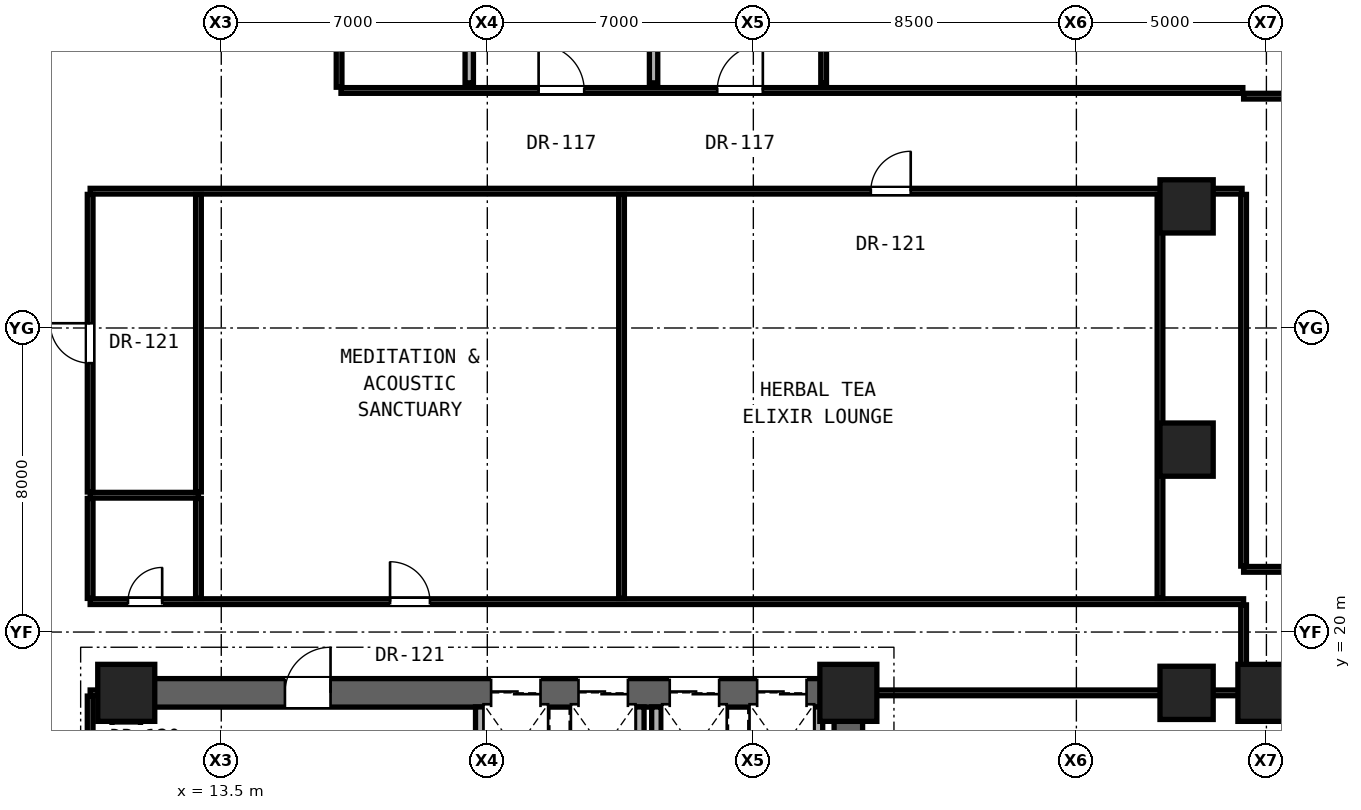
"""IFC4 building model, lengths in metres.
Left out: names, types, materials, properties, quantities, classifications, styles, units other than length and angle.
Written with IfcOpenShell. Run it as: python <this file> out.ifc"""

import sys

from ifc_helpers import new_model, si_unit, direction, frame, frame_2d, origin, origin_2d, place, context, subcontext, project, spatial, rectangle, hollow_rectangle, extrude, element, fill, save


model = new_model("IFC4")
c1 = context("Model", 3, precision=1e-05, world=origin(), true_north=direction((0.0, 1.0)))
c2 = subcontext(c1, "Body", "Model", "MODEL_VIEW")
j1 = project(units=[si_unit("LENGTHUNIT", "METRE"), si_unit("PLANEANGLEUNIT", "RADIAN")], contexts=[c1])
p1 = place(None, origin())
s1 = spatial("IfcSite", under=j1, at=p1, CompositionType="ELEMENT")
p2 = place(p1, origin())
s2 = spatial("IfcBuilding", under=s1, at=p2, CompositionType="ELEMENT")
p3 = place(p2, frame((0.0, 0.0, 18.1)))
s3 = spatial("IfcBuildingStorey", under=s2, at=p3, CompositionType="ELEMENT", Elevation=18.1)
for number, where, z_axis, x_axis in (
    (1, (11.0, 18.4, 0.0), (0.0, 0.0, 1.0), (1.0, 0.0, 0.0)),
    (2, (30.0, 18.4, 0.0), (0.0, 0.0, 1.0), (1.0, 0.0, 0.0)),
):
    element("IfcColumn", number, at=place(p3, frame(where, z_axis=z_axis, x_axis=x_axis)), inside=s3, PredefinedType="COLUMN", context=c2, shape_type="SweptSolid", body=[
        extrude(rectangle(XDim=1.5, YDim=1.5, at=origin_2d()), origin(), (0.0, 0.0, 1.0), 4.3),
    ])
for number, where, z_axis, x_axis in (
    (3, (38.9, 18.4, 0.0), (0.0, 0.0, 1.0), (1.0, 0.0, 0.0)),
    (4, (38.9, 24.8, 0.0), (0.0, 0.0, 1.0), (1.0, 0.0, 0.0)),
    (5, (38.9, 31.2, 0.0), (0.0, 0.0, 1.0), (1.0, 0.0, 0.0)),
):
    element("IfcColumn", number, at=place(p3, frame(where, z_axis=z_axis, x_axis=x_axis)), inside=s3, PredefinedType="COLUMN", context=c2, shape_type="SweptSolid", body=[
        extrude(hollow_rectangle(XDim=1.4, YDim=1.4, WallThickness=0.08, at=origin_2d()), origin(), (0.0, 0.0, 1.0), 4.3),
    ])
for number, where, z_axis, x_axis in (
    (6, (11.0, 12.4, 0.0), (0.0, 0.0, 1.0), (0.0, 1.0, 0.0)),
    (7, (30.0, 12.4, 0.0), (0.0, 0.0, 1.0), (0.0, 1.0, 0.0)),
):
    element("IfcWall", number, at=place(p3, frame(where, z_axis=z_axis, x_axis=x_axis)), inside=s3, PredefinedType="SHEAR", context=c2, shape_type="SweptSolid", body=[
        extrude(rectangle(XDim=6.0, YDim=0.75, at=frame_2d((3.0, 0.0))), origin(), (0.0, 0.0, 1.0), 3.65),
    ])
p4 = place(p3, frame((11.0, 18.4, 0.0), z_axis=(0.0, 0.0, 1.0), x_axis=(1.0, 0.0, 0.0)))
e8 = element("IfcWall", 8, at=p4, inside=s3, PredefinedType="SHEAR", context=c2, shape_type="SweptSolid", body=[
    extrude(rectangle(XDim=19.0, YDim=0.75, at=frame_2d((9.5, 0.0))), origin(), (0.0, 0.0, 1.0), 3.65),
])
p5 = place(p4, frame((4.175, 0.0, 0.0)))
e9 = element("IfcOpeningElement", 9, at=p5, cuts=e8, PredefinedType="OPENING", context=c2, shape_type="SweptSolid", body=[
    extrude(rectangle(XDim=1.2, YDim=2.25, at=frame_2d((0.6, 1.125))), frame((0.0, 0.385, 0.0), z_axis=(0.0, -1.0, 0.0), x_axis=(1.0, 0.0, 0.0)), (0.0, 0.0, 1.0), 0.77),
])
p6 = place(p4, frame((9.6, 0.0, 0.0)))
e10 = element("IfcOpeningElement", 10, at=p6, cuts=e8, PredefinedType="OPENING", context=c2, shape_type="SweptSolid", body=[
    extrude(rectangle(XDim=1.3, YDim=2.3, at=frame_2d((0.65, 1.15))), frame((0.0, 0.385, 0.0), z_axis=(0.0, -1.0, 0.0), x_axis=(1.0, 0.0, 0.0)), (0.0, 0.0, 1.0), 0.77),
])
p7 = place(p4, frame((11.9, 0.0, 0.0)))
e11 = element("IfcOpeningElement", 11, at=p7, cuts=e8, PredefinedType="OPENING", context=c2, shape_type="SweptSolid", body=[
    extrude(rectangle(XDim=1.3, YDim=2.3, at=frame_2d((0.65, 1.15))), frame((0.0, 0.385, 0.0), z_axis=(0.0, -1.0, 0.0), x_axis=(1.0, 0.0, 0.0)), (0.0, 0.0, 1.0), 0.77),
])
p8 = place(p4, frame((14.3, 0.0, 0.0)))
e12 = element("IfcOpeningElement", 12, at=p8, cuts=e8, PredefinedType="OPENING", context=c2, shape_type="SweptSolid", body=[
    extrude(rectangle(XDim=1.3, YDim=2.3, at=frame_2d((0.65, 1.15))), frame((0.0, 0.385, 0.0), z_axis=(0.0, -1.0, 0.0), x_axis=(1.0, 0.0, 0.0)), (0.0, 0.0, 1.0), 0.77),
])
p9 = place(p4, frame((16.6, 0.0, 0.0)))
e13 = element("IfcOpeningElement", 13, at=p9, cuts=e8, PredefinedType="OPENING", context=c2, shape_type="SweptSolid", body=[
    extrude(rectangle(XDim=1.3, YDim=2.3, at=frame_2d((0.65, 1.15))), frame((0.0, 0.385, 0.0), z_axis=(0.0, -1.0, 0.0), x_axis=(1.0, 0.0, 0.0)), (0.0, 0.0, 1.0), 0.77),
])
p10 = place(p3, frame((41.0, 18.4, 0.0), z_axis=(0.0, 0.0, 1.0), x_axis=(1.0, 0.0, 0.0)))
e14 = element("IfcColumn", 14, at=p10, inside=s3, PredefinedType="COLUMN", context=c2, shape_type="SweptSolid", body=[
    extrude(rectangle(XDim=1.5, YDim=1.5, at=origin_2d()), origin(), (0.0, 0.0, 1.0), 4.3),
])
p11 = place(p3, frame((10.05, 18.4, 0.0), z_axis=(0.0, 0.0, 1.0), x_axis=(1.0, 0.0, 0.0)))
e15 = element("IfcWall", 15, at=p11, inside=s3, PredefinedType="PARTITIONING", context=c2, shape_type="SweptSolid", body=[
    extrude(rectangle(XDim=0.58, YDim=0.15, at=frame_2d((0.29, 0.0))), origin(), (0.0, 0.0, 1.0), 2.542),
])
p12 = place(p3, frame((30.37, 18.4, 0.0), z_axis=(0.0, 0.0, 1.0), x_axis=(1.0, 0.0, 0.0)))
e16 = element("IfcWall", 16, at=p12, inside=s3, PredefinedType="PARTITIONING", context=c2, shape_type="SweptSolid", body=[
    extrude(rectangle(XDim=10.03, YDim=0.15, at=frame_2d((5.015, 0.0))), origin(), (0.0, 0.0, 1.0), 2.542),
])
p13 = place(p3, frame((10.05, 20.8, 0.0), z_axis=(0.0, 0.0, 1.0), x_axis=(1.0, 0.0, 0.0)))
e17 = element("IfcWall", 17, at=p13, inside=s3, PredefinedType="PARTITIONING", context=c2, shape_type="SweptSolid", body=[
    extrude(rectangle(XDim=30.35, YDim=0.15, at=frame_2d((15.175, 0.0))), origin(), (0.0, 0.0, 1.0), 2.602),
])
p14 = place(p13, frame((0.995, 0.0, 0.0)))
e18 = element("IfcOpeningElement", 18, at=p14, cuts=e17, PredefinedType="OPENING", context=c2, shape_type="SweptSolid", body=[
    extrude(rectangle(XDim=0.9, YDim=2.1, at=frame_2d((0.45, 1.05))), frame((0.0, 0.085, 0.0), z_axis=(0.0, -1.0, 0.0), x_axis=(1.0, 0.0, 0.0)), (0.0, 0.0, 1.0), 0.17),
])
p15 = place(p13, frame((7.891, 0.0, 0.0)))
e19 = element("IfcOpeningElement", 19, at=p15, cuts=e17, PredefinedType="OPENING", context=c2, shape_type="SweptSolid", body=[
    extrude(rectangle(XDim=1.05, YDim=2.2, at=frame_2d((0.525, 1.1))), frame((0.0, 0.085, 0.0), z_axis=(0.0, -1.0, 0.0), x_axis=(1.0, 0.0, 0.0)), (0.0, 0.0, 1.0), 0.17),
])
p16 = place(p3, frame((40.4, 21.65, 0.0), z_axis=(0.0, 0.0, 1.0), x_axis=(1.0, 0.0, 0.0)))
e20 = element("IfcWall", 20, at=p16, inside=s3, PredefinedType="PARTITIONING", context=c2, shape_type="SweptSolid", body=[
    extrude(rectangle(XDim=21.4, YDim=0.15, at=frame_2d((10.7, 0.0))), origin(), (0.0, 0.0, 1.0), 2.602),
])
p17 = place(p3, frame((10.05, 23.6, 0.0), z_axis=(0.0, 0.0, 1.0), x_axis=(1.0, 0.0, 0.0)))
e21 = element("IfcWall", 21, at=p17, inside=s3, PredefinedType="PARTITIONING", context=c2, shape_type="SweptSolid", body=[
    extrude(rectangle(XDim=2.85, YDim=0.15, at=frame_2d((1.425, 0.0))), origin(), (0.0, 0.0, 1.0), 2.602),
])
p18 = place(p3, frame((10.05, 31.6, 0.0), z_axis=(0.0, 0.0, 1.0), x_axis=(1.0, 0.0, 0.0)))
e22 = element("IfcWall", 22, at=p18, inside=s3, PredefinedType="PARTITIONING", context=c2, shape_type="SweptSolid", body=[
    extrude(rectangle(XDim=30.31, YDim=0.15, at=frame_2d((15.155, 0.0))), origin(), (0.0, 0.0, 1.0), 2.602),
])
p19 = place(p18, frame((20.541, 0.0, 0.0)))
e23 = element("IfcOpeningElement", 23, at=p19, cuts=e22, PredefinedType="OPENING", context=c2, shape_type="SweptSolid", body=[
    extrude(rectangle(XDim=1.05, YDim=2.2, at=frame_2d((0.525, 1.1))), frame((0.0, 0.085, 0.0), z_axis=(0.0, -1.0, 0.0), x_axis=(1.0, 0.0, 0.0)), (0.0, 0.0, 1.0), 0.17),
])
p20 = place(p3, frame((40.4, 34.1, 0.0), z_axis=(0.0, 0.0, 1.0), x_axis=(1.0, 0.0, 0.0)))
e24 = element("IfcWall", 24, at=p20, inside=s3, PredefinedType="PARTITIONING", context=c2, shape_type="SweptSolid", body=[
    extrude(rectangle(XDim=21.4, YDim=0.15, at=frame_2d((10.7, 0.0))), origin(), (0.0, 0.0, 1.0), 2.602),
])
p21 = place(p3, frame((16.65, 34.25, 0.0), z_axis=(0.0, 0.0, 1.0), x_axis=(1.0, 0.0, 0.0)))
e25 = element("IfcWall", 25, at=p21, inside=s3, PredefinedType="PARTITIONING", context=c2, shape_type="SweptSolid", body=[
    extrude(rectangle(XDim=23.73, YDim=0.15, at=frame_2d((11.865, 0.0))), origin(), (0.0, 0.0, 1.0), 2.602),
])
p22 = place(p21, frame((5.2, 0.0, 0.0)))
e26 = element("IfcOpeningElement", 26, at=p22, cuts=e25, PredefinedType="OPENING", context=c2, shape_type="SweptSolid", body=[
    extrude(rectangle(XDim=1.2, YDim=2.25, at=frame_2d((0.6, 1.125))), frame((0.0, 0.085, 0.0), z_axis=(0.0, -1.0, 0.0), x_axis=(1.0, 0.0, 0.0)), (0.0, 0.0, 1.0), 0.17),
])
p23 = place(p21, frame((9.9, 0.0, 0.0)))
e27 = element("IfcOpeningElement", 27, at=p23, cuts=e25, PredefinedType="OPENING", context=c2, shape_type="SweptSolid", body=[
    extrude(rectangle(XDim=1.2, YDim=2.25, at=frame_2d((0.6, 1.125))), frame((0.0, 0.085, 0.0), z_axis=(0.0, -1.0, 0.0), x_axis=(1.0, 0.0, 0.0)), (0.0, 0.0, 1.0), 0.17),
])
p24 = place(p3, frame((10.05, 12.735, 0.0), z_axis=(0.0, 0.0, 1.0), x_axis=(0.0, 1.0, 0.0)))
e28 = element("IfcWall", 28, at=p24, inside=s3, PredefinedType="PARTITIONING", context=c2, shape_type="SweptSolid", body=[
    extrude(rectangle(XDim=5.58, YDim=0.15, at=frame_2d((2.79, 0.0))), origin(), (0.0, 0.0, 1.0), 2.542),
])
p25 = place(p3, frame((10.05, 20.885, 0.0), z_axis=(0.0, 0.0, 1.0), x_axis=(0.0, 1.0, 0.0)))
e29 = element("IfcWall", 29, at=p25, inside=s3, PredefinedType="PARTITIONING", context=c2, shape_type="SweptSolid", body=[
    extrude(rectangle(XDim=2.63, YDim=0.15, at=frame_2d((1.315, 0.0))), origin(), (0.0, 0.0, 1.0), 3.65),
])
p26 = place(p3, frame((10.05, 23.685, 0.0), z_axis=(0.0, 0.0, 1.0), x_axis=(0.0, 1.0, 0.0)))
e30 = element("IfcWall", 30, at=p26, inside=s3, PredefinedType="PARTITIONING", context=c2, shape_type="SweptSolid", body=[
    extrude(rectangle(XDim=7.83, YDim=0.15, at=frame_2d((3.915, 0.0))), origin(), (0.0, 0.0, 1.0), 2.869),
])
p27 = place(p26, frame((3.39, 0.0, 0.0)))
e31 = element("IfcOpeningElement", 31, at=p27, cuts=e30, PredefinedType="OPENING", context=c2, shape_type="SweptSolid", body=[
    extrude(rectangle(XDim=1.05, YDim=2.2, at=frame_2d((0.525, 1.1))), frame((0.0, 0.085, 0.0), z_axis=(0.0, -1.0, 0.0), x_axis=(1.0, 0.0, 0.0)), (0.0, 0.0, 1.0), 0.17),
])
p28 = place(p3, frame((12.9, 20.885, 0.0), z_axis=(0.0, 0.0, 1.0), x_axis=(0.0, 1.0, 0.0)))
e32 = element("IfcWall", 32, at=p28, inside=s3, PredefinedType="PARTITIONING", context=c2, shape_type="SweptSolid", body=[
    extrude(rectangle(XDim=2.63, YDim=0.15, at=frame_2d((1.315, 0.0))), origin(), (0.0, 0.0, 1.0), 3.65),
])
p29 = place(p3, frame((12.9, 23.685, 0.0), z_axis=(0.0, 0.0, 1.0), x_axis=(0.0, 1.0, 0.0)))
e33 = element("IfcWall", 33, at=p29, inside=s3, PredefinedType="PARTITIONING", context=c2, shape_type="SweptSolid", body=[
    extrude(rectangle(XDim=7.83, YDim=0.15, at=frame_2d((3.915, 0.0))), origin(), (0.0, 0.0, 1.0), 2.602),
])
p30 = place(p3, frame((16.6, 34.335, 0.0), z_axis=(0.0, 0.0, 1.0), x_axis=(0.0, 1.0, 0.0)))
e34 = element("IfcWall", 34, at=p30, inside=s3, PredefinedType="PARTITIONING", context=c2, shape_type="SweptSolid", body=[
    extrude(rectangle(XDim=2.895, YDim=0.15, at=frame_2d((1.448, 0.0))), origin(), (0.0, 0.0, 1.0), 3.65),
])
p31 = place(p30, frame((1.06, 0.0, 0.0)))
e35 = element("IfcOpeningElement", 35, at=p31, cuts=e34, PredefinedType="OPENING", context=c2, shape_type="SweptSolid", body=[
    extrude(rectangle(XDim=0.85, YDim=2.01, at=frame_2d((0.425, 1.005))), frame((0.0, 0.085, 0.0), z_axis=(0.0, -1.0, 0.0), x_axis=(1.0, 0.0, 0.0)), (0.0, 0.0, 1.0), 0.17),
])
p32 = place(p3, frame((20.025, 34.45, 0.0), z_axis=(0.0, 0.0, 1.0), x_axis=(0.0, 1.0, 0.0)))
e36 = element("IfcWall", 36, at=p32, inside=s3, PredefinedType="SOLIDWALL", context=c2, shape_type="SweptSolid", body=[
    extrude(rectangle(XDim=2.78, YDim=0.22, at=frame_2d((1.39, 0.0))), origin(), (0.0, 0.0, 1.0), 3.65),
])
p33 = place(p3, frame((20.315, 16.555, 0.0), z_axis=(0.0, 0.0, 1.0), x_axis=(0.0, 1.0, 0.0)))
e37 = element("IfcWall", 37, at=p33, inside=s3, PredefinedType="SOLIDWALL", context=c2, shape_type="SweptSolid", body=[
    extrude(rectangle(XDim=1.475, YDim=0.25, at=frame_2d((0.738, 0.0))), origin(), (0.0, 0.0, 1.0), 3.65),
])
p34 = place(p3, frame((24.032, 20.885, 0.0), z_axis=(0.0, 0.0, 1.0), x_axis=(0.0, 1.0, 0.0)))
e38 = element("IfcWall", 38, at=p34, inside=s3, PredefinedType="PARTITIONING", context=c2, shape_type="SweptSolid", body=[
    extrude(rectangle(XDim=10.63, YDim=0.15, at=frame_2d((5.315, 0.0))), origin(), (0.0, 0.0, 1.0), 2.602),
])
for number, where, z_axis, x_axis in (
    (39, (24.5, 15.785, 0.0), (0.0, 0.0, 1.0), (0.0, 1.0, 0.0)),
    (40, (24.95, 15.785, 0.0), (0.0, 0.0, 1.0), (0.0, 1.0, 0.0)),
):
    element("IfcWall", number, at=place(p3, frame(where, z_axis=z_axis, x_axis=x_axis)), inside=s3, PredefinedType="SOLIDWALL", context=c2, shape_type="SweptSolid", body=[
        extrude(rectangle(XDim=2.245, YDim=0.25, at=frame_2d((1.123, 0.0))), origin(), (0.0, 0.0, 1.0), 3.65),
    ])
p35 = place(p3, frame((24.875, 34.45, 0.0), z_axis=(0.0, 0.0, 1.0), x_axis=(0.0, 1.0, 0.0)))
e41 = element("IfcWall", 41, at=p35, inside=s3, PredefinedType="SOLIDWALL", context=c2, shape_type="SweptSolid", body=[
    extrude(rectangle(XDim=2.78, YDim=0.22, at=frame_2d((1.39, 0.0))), origin(), (0.0, 0.0, 1.0), 3.65),
])
p36 = place(p3, frame((29.2, 15.785, 0.0), z_axis=(0.0, 0.0, 1.0), x_axis=(0.0, 1.0, 0.0)))
e42 = element("IfcWall", 42, at=p36, inside=s3, PredefinedType="SOLIDWALL", context=c2, shape_type="SweptSolid", body=[
    extrude(rectangle(XDim=2.245, YDim=0.25, at=frame_2d((1.123, 0.0))), origin(), (0.0, 0.0, 1.0), 3.65),
])
p37 = place(p3, frame((29.35, 34.45, 0.0), z_axis=(0.0, 0.0, 1.0), x_axis=(0.0, 1.0, 0.0)))
e43 = element("IfcWall", 43, at=p37, inside=s3, PredefinedType="PARTITIONING", context=c2, shape_type="SweptSolid", body=[
    extrude(rectangle(XDim=2.78, YDim=0.15, at=frame_2d((1.39, 0.0))), origin(), (0.0, 0.0, 1.0), 3.65),
])
p38 = place(p3, frame((38.2, 20.885, 0.0), z_axis=(0.0, 0.0, 1.0), x_axis=(0.0, 1.0, 0.0)))
e44 = element("IfcWall", 44, at=p38, inside=s3, PredefinedType="PARTITIONING", context=c2, shape_type="SweptSolid", body=[
    extrude(rectangle(XDim=10.63, YDim=0.15, at=frame_2d((5.315, 0.0))), origin(), (0.0, 0.0, 1.0), 2.869),
])
p39 = place(p3, frame((40.4, 18.485, 0.0), z_axis=(0.0, 0.0, 1.0), x_axis=(0.0, 1.0, 0.0)))
e45 = element("IfcWall", 45, at=p39, inside=s3, PredefinedType="PARTITIONING", context=c2, shape_type="SweptSolid", body=[
    extrude(rectangle(XDim=2.23, YDim=0.15, at=frame_2d((1.115, 0.0))), origin(), (0.0, 0.0, 1.0), 2.694),
])
p40 = place(p3, frame((40.4, 21.735, 0.0), z_axis=(0.0, 0.0, 1.0), x_axis=(0.0, 1.0, 0.0)))
e46 = element("IfcWall", 46, at=p40, inside=s3, PredefinedType="PARTITIONING", context=c2, shape_type="SweptSolid", body=[
    extrude(rectangle(XDim=9.78, YDim=0.15, at=frame_2d((4.89, 0.0))), origin(), (0.0, 0.0, 1.0), 3.65),
])
p41 = place(p22, origin())
e47 = element("IfcDoor", 47, at=p41, inside=s3, OperationType="SINGLE_SWING_LEFT", PredefinedType="DOOR", context=c2, shape_type="SweptSolid", body=[
    extrude(rectangle(XDim=1.2, YDim=2.25, at=frame_2d((0.6, 1.125))), frame((0.0, 0.025, 0.0), z_axis=(0.0, -1.0, 0.0), x_axis=(1.0, 0.0, 0.0)), (0.0, 0.0, 1.0), 0.05),
])
fill(e26, e47)
p42 = place(p23, origin())
e48 = element("IfcDoor", 48, at=p42, inside=s3, OperationType="SINGLE_SWING_RIGHT", PredefinedType="DOOR", context=c2, shape_type="SweptSolid", body=[
    extrude(rectangle(XDim=1.2, YDim=2.25, at=frame_2d((0.6, 1.125))), frame((0.0, 0.025, 0.0), z_axis=(0.0, -1.0, 0.0), x_axis=(1.0, 0.0, 0.0)), (0.0, 0.0, 1.0), 0.05),
])
fill(e27, e48)
p43 = place(p5, origin())
e49 = element("IfcDoor", 49, at=p43, inside=s3, OperationType="SINGLE_SWING_RIGHT", PredefinedType="DOOR", context=c2, shape_type="SweptSolid", body=[
    extrude(rectangle(XDim=1.2, YDim=2.25, at=frame_2d((0.6, 1.125))), frame((0.0, 0.025, 0.0), z_axis=(0.0, -1.0, 0.0), x_axis=(1.0, 0.0, 0.0)), (0.0, 0.0, 1.0), 0.05),
])
fill(e9, e49)
p44 = place(p14, origin())
e50 = element("IfcDoor", 50, at=p44, inside=s3, OperationType="SINGLE_SWING_RIGHT", PredefinedType="DOOR", context=c2, shape_type="SweptSolid", body=[
    extrude(rectangle(XDim=0.9, YDim=2.1, at=frame_2d((0.45, 1.05))), frame((0.0, 0.025, 0.0), z_axis=(0.0, -1.0, 0.0), x_axis=(1.0, 0.0, 0.0)), (0.0, 0.0, 1.0), 0.05),
])
fill(e18, e50)
p45 = place(p27, origin())
e51 = element("IfcDoor", 51, at=p45, inside=s3, OperationType="SINGLE_SWING_RIGHT", PredefinedType="DOOR", context=c2, shape_type="SweptSolid", body=[
    extrude(rectangle(XDim=1.05, YDim=2.2, at=frame_2d((0.525, 1.1))), frame((0.0, 0.025, 0.0), z_axis=(0.0, -1.0, 0.0), x_axis=(1.0, 0.0, 0.0)), (0.0, 0.0, 1.0), 0.05),
])
fill(e31, e51)
p46 = place(p15, origin())
e52 = element("IfcDoor", 52, at=p46, inside=s3, OperationType="SINGLE_SWING_LEFT", PredefinedType="DOOR", context=c2, shape_type="SweptSolid", body=[
    extrude(rectangle(XDim=1.05, YDim=2.2, at=frame_2d((0.525, 1.1))), frame((0.0, 0.025, 0.0), z_axis=(0.0, -1.0, 0.0), x_axis=(1.0, 0.0, 0.0)), (0.0, 0.0, 1.0), 0.05),
])
fill(e19, e52)
p47 = place(p19, origin())
e53 = element("IfcDoor", 53, at=p47, inside=s3, OperationType="SINGLE_SWING_RIGHT", PredefinedType="DOOR", context=c2, shape_type="SweptSolid", body=[
    extrude(rectangle(XDim=1.05, YDim=2.2, at=frame_2d((0.525, 1.1))), frame((0.0, 0.025, 0.0), z_axis=(0.0, -1.0, 0.0), x_axis=(1.0, 0.0, 0.0)), (0.0, 0.0, 1.0), 0.05),
])
fill(e23, e53)
p48 = place(p6, origin())
e54 = element("IfcDoor", 54, at=p48, inside=s3, OperationType="DOUBLE_DOOR_SLIDING", PredefinedType="DOOR", context=c2, shape_type="SweptSolid", body=[
    extrude(rectangle(XDim=1.3, YDim=2.3, at=frame_2d((0.65, 1.15))), frame((0.0, 0.025, 0.0), z_axis=(0.0, -1.0, 0.0), x_axis=(1.0, 0.0, 0.0)), (0.0, 0.0, 1.0), 0.05),
])
fill(e10, e54)
p49 = place(p7, origin())
e55 = element("IfcDoor", 55, at=p49, inside=s3, OperationType="DOUBLE_DOOR_SLIDING", PredefinedType="DOOR", context=c2, shape_type="SweptSolid", body=[
    extrude(rectangle(XDim=1.3, YDim=2.3, at=frame_2d((0.65, 1.15))), frame((0.0, 0.025, 0.0), z_axis=(0.0, -1.0, 0.0), x_axis=(1.0, 0.0, 0.0)), (0.0, 0.0, 1.0), 0.05),
])
fill(e11, e55)
p50 = place(p8, origin())
e56 = element("IfcDoor", 56, at=p50, inside=s3, OperationType="DOUBLE_DOOR_SLIDING", PredefinedType="DOOR", context=c2, shape_type="SweptSolid", body=[
    extrude(rectangle(XDim=1.3, YDim=2.3, at=frame_2d((0.65, 1.15))), frame((0.0, 0.025, 0.0), z_axis=(0.0, -1.0, 0.0), x_axis=(1.0, 0.0, 0.0)), (0.0, 0.0, 1.0), 0.05),
])
fill(e12, e56)
p51 = place(p9, origin())
e57 = element("IfcDoor", 57, at=p51, inside=s3, OperationType="DOUBLE_DOOR_SLIDING", PredefinedType="DOOR", context=c2, shape_type="SweptSolid", body=[
    extrude(rectangle(XDim=1.3, YDim=2.3, at=frame_2d((0.65, 1.15))), frame((0.0, 0.025, 0.0), z_axis=(0.0, -1.0, 0.0), x_axis=(1.0, 0.0, 0.0)), (0.0, 0.0, 1.0), 0.05),
])
fill(e13, e57)
save(model, sys.argv[1])
